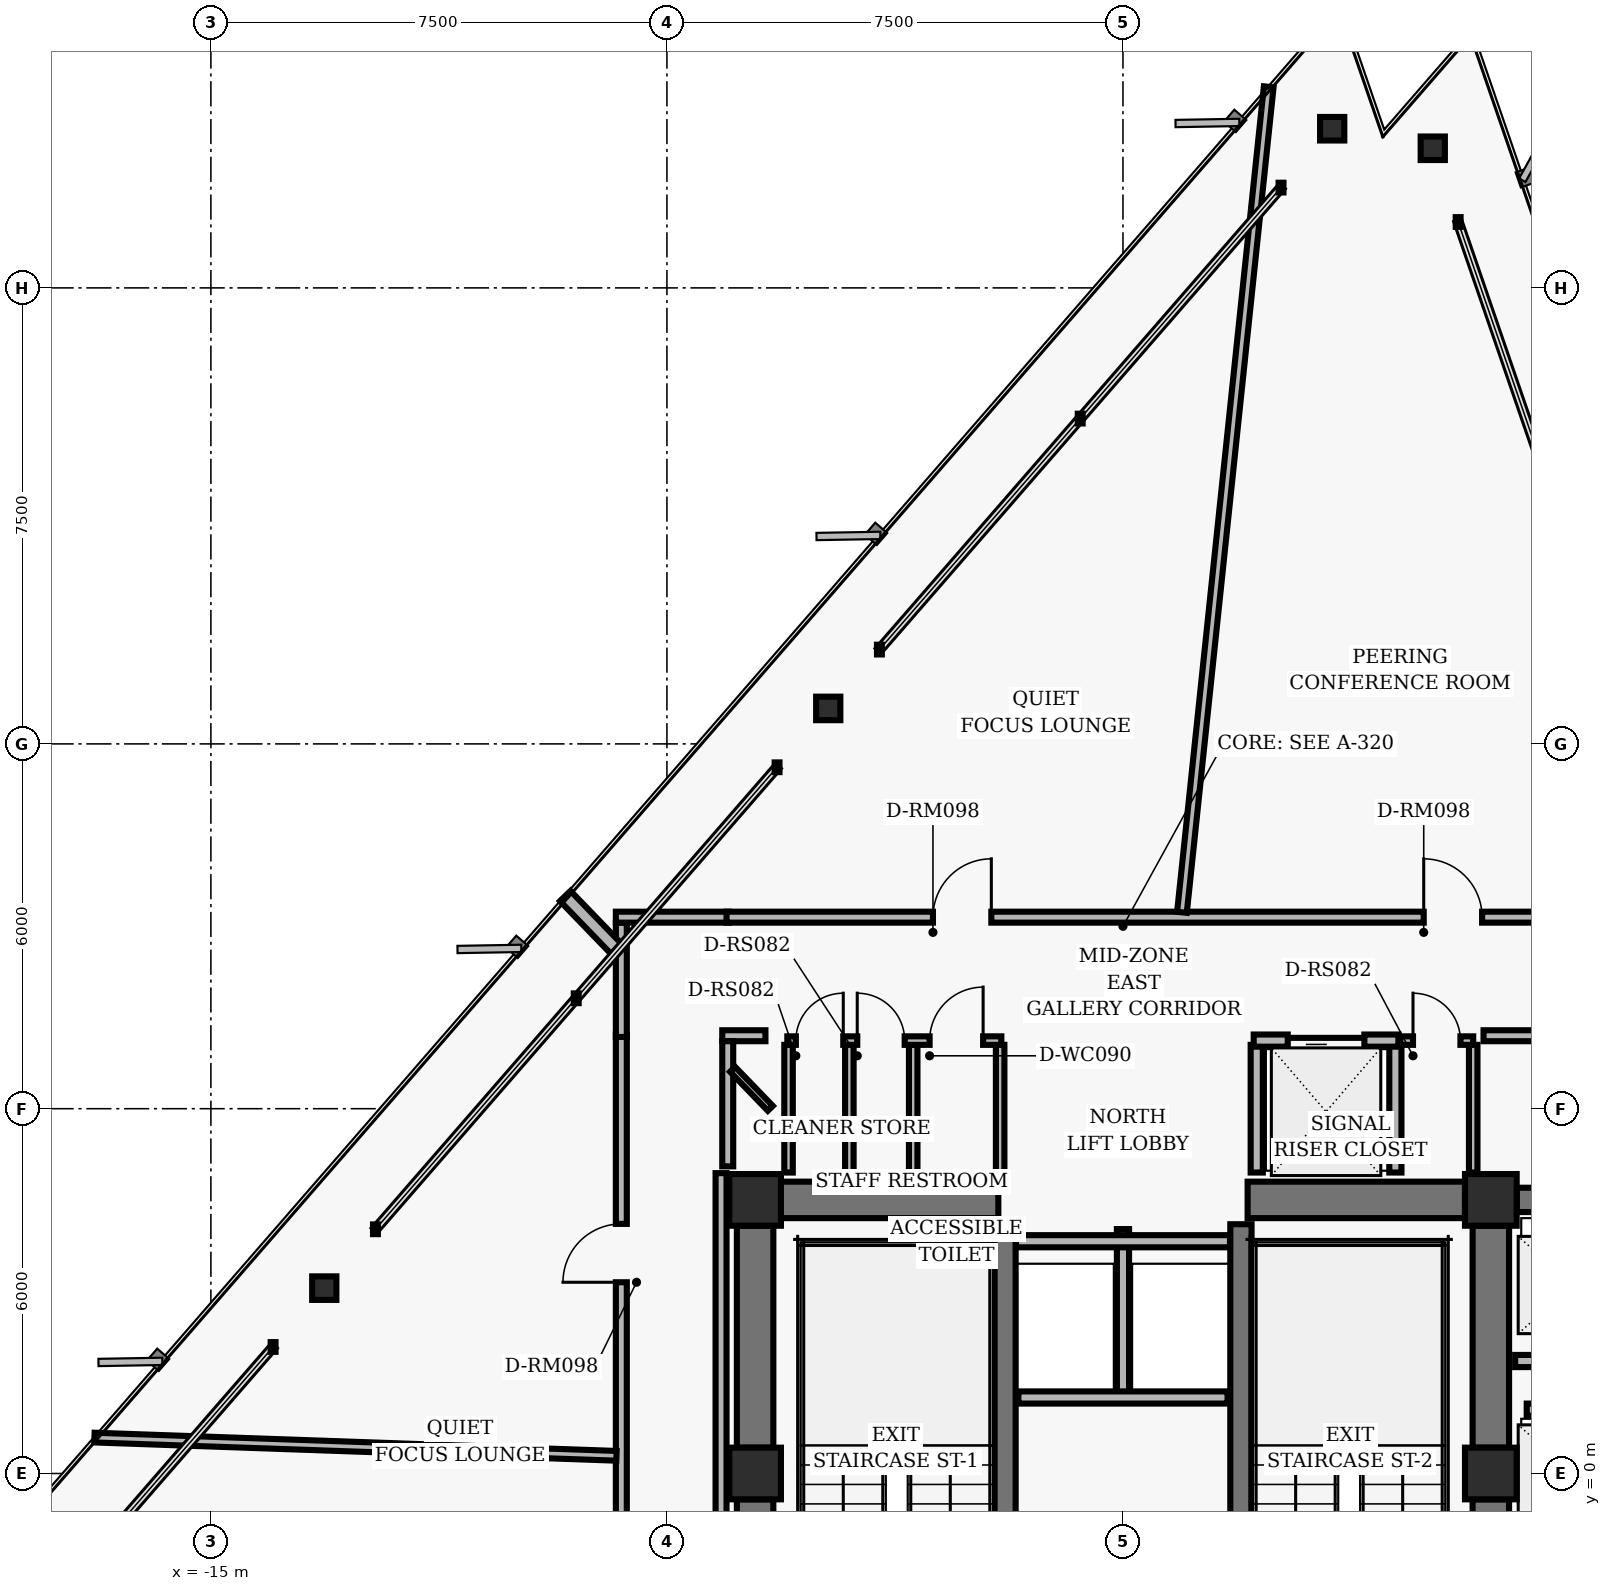
"""IFC4 building model, lengths in metres.
Left out: names, types, materials, properties, quantities, classifications, styles, units other than length and angle.
Written with IfcOpenShell. Run it as: python <this file> out.ifc"""

import sys

from ifc_helpers import new_model, si_unit, direction, frame, frame_2d, origin, origin_2d, place, context, subcontext, project, spatial, rectangle, hollow_rectangle, i_section, extrude, element, fill, save


model = new_model("IFC4")
c1 = context("Model", 3, precision=1e-05, world=origin(), true_north=direction((0.0, 1.0)))
c2 = subcontext(c1, "Body", "Model", "MODEL_VIEW")
j1 = project(units=[si_unit("LENGTHUNIT", "METRE"), si_unit("PLANEANGLEUNIT", "RADIAN")], contexts=[c1])
p1 = place(None, origin())
s1 = spatial("IfcSite", under=j1, at=p1, CompositionType="ELEMENT")
p2 = place(p1, origin())
s2 = spatial("IfcBuilding", under=s1, at=p2, CompositionType="ELEMENT")
p3 = place(p2, frame((0.0, 0.0, 165.44)))
s3 = spatial("IfcBuildingStorey", under=s2, at=p3, CompositionType="ELEMENT", Elevation=165.44)
for number, where, z_axis, x_axis in (
    (1, (-6.05, 4.5, 0.0), (0.0, 0.0, 1.0), (1.0, 0.0, 0.0)),
    (2, (6.05, 4.5, 0.0), (0.0, 0.0, 1.0), (1.0, 0.0, 0.0)),
    (3, (-6.05, 0.0, 0.0), (0.0, 0.0, 1.0), (1.0, 0.0, 0.0)),
    (4, (6.05, 0.0, 0.0), (0.0, 0.0, 1.0), (1.0, 0.0, 0.0)),
):
    element("IfcColumn", number, at=place(p3, frame(where, z_axis=z_axis, x_axis=x_axis)), inside=s3, PredefinedType="COLUMN", context=c2, shape_type="SweptSolid", body=[
        extrude(hollow_rectangle(XDim=0.85, YDim=0.85, WallThickness=0.055, InnerFilletRadius=0.02, OuterFilletRadius=0.04, at=origin_2d()), origin(), (0.0, 0.0, 1.0), 3.04),
    ])
p4 = place(p3, frame((-6.05, 0.425, 0.0), z_axis=(0.0, 0.0, 1.0), x_axis=(0.0, 1.0, 0.0)))
e5 = element("IfcWall", 5, at=p4, inside=s3, PredefinedType="SHEAR", context=c2, shape_type="SweptSolid", body=[
    extrude(rectangle(XDim=3.65, YDim=0.6, at=frame_2d((1.825, 0.0))), origin(), (0.0, 0.0, 1.0), 2.788),
])
p5 = place(p3, frame((-6.05, -3.875, 0.0), z_axis=(0.0, 0.0, 1.0), x_axis=(0.0, 1.0, 0.0)))
e6 = element("IfcWall", 6, at=p5, inside=s3, PredefinedType="SHEAR", context=c2, shape_type="SweptSolid", body=[
    extrude(rectangle(XDim=3.45, YDim=0.6, at=frame_2d((1.725, 0.0))), origin(), (0.0, 0.0, 1.0), 2.788),
])
p6 = place(p3, frame((6.05, 0.425, 0.0), z_axis=(0.0, 0.0, 1.0), x_axis=(0.0, 1.0, 0.0)))
e7 = element("IfcWall", 7, at=p6, inside=s3, PredefinedType="SHEAR", context=c2, shape_type="SweptSolid", body=[
    extrude(rectangle(XDim=3.65, YDim=0.6, at=frame_2d((1.825, 0.0))), origin(), (0.0, 0.0, 1.0), 2.788),
])
p7 = place(p3, frame((6.05, -3.875, 0.0), z_axis=(0.0, 0.0, 1.0), x_axis=(0.0, 1.0, 0.0)))
e8 = element("IfcWall", 8, at=p7, inside=s3, PredefinedType="SHEAR", context=c2, shape_type="SweptSolid", body=[
    extrude(rectangle(XDim=3.45, YDim=0.6, at=frame_2d((1.725, 0.0))), origin(), (0.0, 0.0, 1.0), 2.788),
])
for number, where, z_axis, x_axis in (
    (9, (-1.94, -4.1, 0.0), (0.0, 0.0, 1.0), (0.0, 1.0, 0.0)),
    (10, (1.94, -4.1, 0.0), (0.0, 0.0, 1.0), (0.0, 1.0, 0.0)),
):
    element("IfcWall", number, at=place(p3, frame(where, z_axis=z_axis, x_axis=x_axis)), inside=s3, PredefinedType="SHEAR", context=c2, shape_type="SweptSolid", body=[
        extrude(rectangle(XDim=8.2, YDim=0.35, at=frame_2d((4.1, 0.0))), origin(), (0.0, 0.0, 1.0), 2.788),
    ])
for number, where, z_axis, x_axis in (
    (11, (-5.625, 4.5, 0.0), (0.0, 0.0, 1.0), (1.0, 0.0, 0.0)),
    (12, (2.05, 4.5, 0.0), (0.0, 0.0, 1.0), (1.0, 0.0, 0.0)),
):
    element("IfcWall", number, at=place(p3, frame(where, z_axis=z_axis, x_axis=x_axis)), inside=s3, PredefinedType="SHEAR", context=c2, shape_type="SweptSolid", body=[
        extrude(rectangle(XDim=3.575, YDim=0.6, at=frame_2d((1.788, 0.0))), origin(), (0.0, 0.0, 1.0), 2.788),
    ])
p8 = place(p3, frame((6.475, 4.5, 0.0), z_axis=(0.0, 0.0, 1.0), x_axis=(1.0, 0.0, 0.0)))
e13 = element("IfcWall", 13, at=p8, inside=s3, PredefinedType="SHEAR", context=c2, shape_type="SweptSolid", body=[
    extrude(rectangle(XDim=2.05, YDim=0.4, at=frame_2d((1.025, 0.0))), origin(), (0.0, 0.0, 1.0), 2.788),
])
for number, where, z_axis, x_axis in (
    (14, (5.095, 21.796, 0.0), (0.0, 0.0, 1.0), (1.0, 0.0, 0.0)),
    (15, (3.441, 22.118, 0.0), (0.0, 0.0, 1.0), (1.0, 0.0, 0.0)),
    (16, (-4.847, 12.583, 0.0), (0.0, 0.0, 1.0), (1.0, 0.0, 0.0)),
    (17, (-13.135, 3.049, 0.0), (0.0, 0.0, 1.0), (1.0, 0.0, 0.0)),
):
    element("IfcColumn", number, at=place(p3, frame(where, z_axis=z_axis, x_axis=x_axis)), inside=s3, PredefinedType="COLUMN", context=c2, shape_type="SweptSolid", body=[
        extrude(i_section(OverallWidth=0.398, OverallDepth=0.387, WebThickness=0.021, FlangeThickness=0.033, FilletRadius=0.018, at=origin_2d()), origin(), (0.0, 0.0, 1.0), 3.04),
    ])
p9 = place(p3, frame((0.0, 1.25, 0.0), z_axis=(0.0, 0.0, 1.0), x_axis=(0.0, 1.0, 0.0)))
e18 = element("IfcWall", 18, at=p9, inside=s3, PredefinedType="PARTITIONING", context=c2, shape_type="SweptSolid", body=[
    extrude(rectangle(XDim=2.77, YDim=0.2, at=frame_2d((1.385, 0.0))), origin(), (0.0, 0.0, 1.0), 2.763),
])
p10 = place(p3, frame((-1.72, 1.25, 0.0), z_axis=(0.0, 0.0, 1.0), x_axis=(1.0, 0.0, 0.0)))
e19 = element("IfcWall", 19, at=p10, inside=s3, PredefinedType="PARTITIONING", context=c2, shape_type="SweptSolid", body=[
    extrude(rectangle(XDim=3.44, YDim=0.2, at=frame_2d((1.72, 0.0))), origin(), (0.0, 0.0, 1.0), 2.763),
])
p11 = place(p3, frame((-1.76, 3.82, 0.0), z_axis=(0.0, 0.0, 1.0), x_axis=(1.0, 0.0, 0.0)))
e20 = element("IfcWall", 20, at=p11, inside=s3, PredefinedType="PARTITIONING", context=c2, shape_type="SweptSolid", body=[
    extrude(rectangle(XDim=3.52, YDim=0.2, at=frame_2d((1.76, 0.0))), origin(), (0.0, 0.0, 1.0), 2.763),
])
for number, where, z_axis, x_axis in (
    (21, (2.2, 4.95, 0.0), (0.0, 0.0, 1.0), (0.0, 1.0, 0.0)),
    (22, (4.48, 4.95, 0.0), (0.0, 0.0, 1.0), (0.0, 1.0, 0.0)),
):
    element("IfcWall", number, at=place(p3, frame(where, z_axis=z_axis, x_axis=x_axis)), inside=s3, PredefinedType="PARTITIONING", context=c2, shape_type="SweptSolid", body=[
        extrude(rectangle(XDim=2.1, YDim=0.2, at=frame_2d((1.05, 0.0))), origin(), (0.0, 0.0, 1.0), 2.763),
    ])
p12 = place(p3, frame((2.15, 7.12, 0.0), z_axis=(0.0, 0.0, 1.0), x_axis=(1.0, 0.0, 0.0)))
e23 = element("IfcWall", 23, at=p12, inside=s3, PredefinedType="PARTITIONING", context=c2, shape_type="SweptSolid", body=[
    extrude(rectangle(XDim=2.38, YDim=0.2, at=frame_2d((1.19, 0.0))), origin(), (0.0, 0.0, 1.0), 2.763),
])
p13 = place(p12, frame((0.56, 0.0, 0.0)))
e24 = element("IfcOpeningElement", 24, at=p13, cuts=e23, PredefinedType="OPENING", context=c2, shape_type="SweptSolid", body=[
    extrude(rectangle(XDim=1.26, YDim=2.06, at=frame_2d((0.63, 1.03))), frame((0.0, 0.11, 0.0), z_axis=(0.0, -1.0, 0.0), x_axis=(1.0, 0.0, 0.0)), (0.0, 0.0, 1.0), 0.22),
])
for number, where, z_axis, x_axis in (
    (25, (-5.5, 4.95, 0.0), (0.0, 0.0, 1.0), (0.0, 1.0, 0.0)),
    (26, (-4.5, 4.95, 0.0), (0.0, 0.0, 1.0), (0.0, 1.0, 0.0)),
    (27, (-3.45, 4.95, 0.0), (0.0, 0.0, 1.0), (0.0, 1.0, 0.0)),
    (28, (-2.02, 4.95, 0.0), (0.0, 0.0, 1.0), (0.0, 1.0, 0.0)),
):
    element("IfcWall", number, at=place(p3, frame(where, z_axis=z_axis, x_axis=x_axis)), inside=s3, PredefinedType="PARTITIONING", context=c2, shape_type="SweptSolid", body=[
        extrude(rectangle(XDim=2.1, YDim=0.14, at=frame_2d((1.05, 0.0))), origin(), (0.0, 0.0, 1.0), 2.763),
    ])
p14 = place(p3, frame((-5.52, 7.12, 0.0), z_axis=(0.0, 0.0, 1.0), x_axis=(1.0, 0.0, 0.0)))
e29 = element("IfcWall", 29, at=p14, inside=s3, PredefinedType="PARTITIONING", context=c2, shape_type="SweptSolid", body=[
    extrude(rectangle(XDim=3.52, YDim=0.14, at=frame_2d((1.76, 0.0))), origin(), (0.0, 0.0, 1.0), 2.763),
])
p15 = place(p14, frame((0.14, 0.0, 0.0)))
e30 = element("IfcOpeningElement", 30, at=p15, cuts=e29, PredefinedType="OPENING", context=c2, shape_type="SweptSolid", body=[
    extrude(rectangle(XDim=0.78, YDim=2.01, at=frame_2d((0.39, 1.005))), frame((0.0, 0.08, 0.0), z_axis=(0.0, -1.0, 0.0), x_axis=(1.0, 0.0, 0.0)), (0.0, 0.0, 1.0), 0.16),
])
p16 = place(p14, frame((1.15, 0.0, 0.0)))
e31 = element("IfcOpeningElement", 31, at=p16, cuts=e29, PredefinedType="OPENING", context=c2, shape_type="SweptSolid", body=[
    extrude(rectangle(XDim=0.78, YDim=2.01, at=frame_2d((0.39, 1.005))), frame((0.0, 0.08, 0.0), z_axis=(0.0, -1.0, 0.0), x_axis=(1.0, 0.0, 0.0)), (0.0, 0.0, 1.0), 0.16),
])
p17 = place(p14, frame((2.34, 0.0, 0.0)))
e32 = element("IfcOpeningElement", 32, at=p17, cuts=e29, PredefinedType="OPENING", context=c2, shape_type="SweptSolid", body=[
    extrude(rectangle(XDim=0.88, YDim=2.02, at=frame_2d((0.44, 1.01))), frame((0.0, 0.08, 0.0), z_axis=(0.0, -1.0, 0.0), x_axis=(1.0, 0.0, 0.0)), (0.0, 0.0, 1.0), 0.16),
])
p18 = place(p3, frame((5.76, 4.95, 0.0), z_axis=(0.0, 0.0, 1.0), x_axis=(0.0, 1.0, 0.0)))
e33 = element("IfcWall", 33, at=p18, inside=s3, PredefinedType="PARTITIONING", context=c2, shape_type="SweptSolid", body=[
    extrude(rectangle(XDim=2.1, YDim=0.14, at=frame_2d((1.05, 0.0))), origin(), (0.0, 0.0, 1.0), 2.763),
])
p19 = place(p3, frame((4.56, 7.12, 0.0), z_axis=(0.0, 0.0, 1.0), x_axis=(1.0, 0.0, 0.0)))
e34 = element("IfcWall", 34, at=p19, inside=s3, PredefinedType="PARTITIONING", context=c2, shape_type="SweptSolid", body=[
    extrude(rectangle(XDim=1.2, YDim=0.14, at=frame_2d((0.6, 0.0))), origin(), (0.0, 0.0, 1.0), 2.763),
])
p20 = place(p19, frame((0.21, 0.0, 0.0)))
e35 = element("IfcOpeningElement", 35, at=p20, cuts=e34, PredefinedType="OPENING", context=c2, shape_type="SweptSolid", body=[
    extrude(rectangle(XDim=0.78, YDim=2.01, at=frame_2d((0.39, 1.005))), frame((0.0, 0.08, 0.0), z_axis=(0.0, -1.0, 0.0), x_axis=(1.0, 0.0, 0.0)), (0.0, 0.0, 1.0), 0.16),
])
p21 = place(p3, frame((6.45, 1.85, 0.0), z_axis=(0.0, 0.0, 1.0), x_axis=(1.0, 0.0, 0.0)))
e36 = element("IfcWall", 36, at=p21, inside=s3, PredefinedType="PARTITIONING", context=c2, shape_type="SweptSolid", body=[
    extrude(rectangle(XDim=2.1, YDim=0.2, at=frame_2d((1.05, 0.0))), origin(), (0.0, 0.0, 1.0), 2.763),
])
p22 = place(p3, frame((6.64, 1.05, 0.0), z_axis=(0.0, 0.0, 1.0), x_axis=(1.0, 0.0, 0.0)))
e37 = element("IfcWall", 37, at=p22, inside=s3, PredefinedType="PARTITIONING", context=c2, shape_type="SweptSolid", body=[
    extrude(rectangle(XDim=1.91, YDim=0.2, at=frame_2d((0.955, 0.0))), origin(), (0.0, 0.0, 1.0), 2.763),
])
p23 = place(p3, frame((-8.25, -7.22, 0.0), z_axis=(0.0, 0.0, 1.0), x_axis=(0.0, 1.0, 0.0)))
e38 = element("IfcWall", 38, at=p23, inside=s3, PredefinedType="PARTITIONING", context=c2, shape_type="SweptSolid", body=[
    extrude(rectangle(XDim=14.44, YDim=0.18, at=frame_2d((7.22, 0.0))), origin(), (0.0, 0.0, 1.0), 2.763),
])
p24 = place(p23, frame((4.478, 0.0, 0.0)))
e39 = element("IfcOpeningElement", 39, at=p24, cuts=e38, PredefinedType="OPENING", context=c2, shape_type="SweptSolid", body=[
    extrude(rectangle(XDim=0.96, YDim=2.02, at=frame_2d((0.48, 1.01))), frame((0.0, 0.1, 0.0), z_axis=(0.0, -1.0, 0.0), x_axis=(1.0, 0.0, 0.0)), (0.0, 0.0, 1.0), 0.2),
])
p25 = place(p23, frame((10.365, 0.0, 0.0)))
e40 = element("IfcOpeningElement", 40, at=p25, cuts=e38, PredefinedType="OPENING", context=c2, shape_type="SweptSolid", body=[
    extrude(rectangle(XDim=0.96, YDim=2.02, at=frame_2d((0.48, 1.01))), frame((0.0, 0.1, 0.0), z_axis=(0.0, -1.0, 0.0), x_axis=(1.0, 0.0, 0.0)), (0.0, 0.0, 1.0), 0.2),
])
p26 = place(p3, frame((-8.25, 7.18, 0.0), z_axis=(0.0, 0.0, 1.0), x_axis=(0.0, 1.0, 0.0)))
e41 = element("IfcWall", 41, at=p26, inside=s3, PredefinedType="PARTITIONING", context=c2, shape_type="SweptSolid", body=[
    extrude(rectangle(XDim=1.88, YDim=0.18, at=frame_2d((0.94, 0.0))), origin(), (0.0, 0.0, 1.0), 2.763),
])
p27 = place(p3, frame((-8.34, 9.15, 0.0), z_axis=(0.0, 0.0, 1.0), x_axis=(1.0, 0.0, 0.0)))
e42 = element("IfcWall", 42, at=p27, inside=s3, PredefinedType="PARTITIONING", context=c2, shape_type="SweptSolid", body=[
    extrude(rectangle(XDim=1.86, YDim=0.18, at=frame_2d((0.93, 0.0))), origin(), (0.0, 0.0, 1.0), 2.763),
])
p28 = place(p3, frame((-6.52, 9.15, 0.0), z_axis=(0.0, 0.0, 1.0), x_axis=(1.0, 0.0, 0.0)))
e43 = element("IfcWall", 43, at=p28, inside=s3, PredefinedType="PARTITIONING", context=c2, shape_type="SweptSolid", body=[
    extrude(rectangle(XDim=16.662, YDim=0.18, at=frame_2d((8.331, 0.0))), origin(), (0.0, 0.0, 1.0), 2.763),
])
p29 = place(p28, frame((11.466, 0.0, 0.0)))
e44 = element("IfcOpeningElement", 44, at=p29, cuts=e43, PredefinedType="OPENING", context=c2, shape_type="SweptSolid", body=[
    extrude(rectangle(XDim=0.96, YDim=2.02, at=frame_2d((0.48, 1.01))), frame((0.0, 0.1, 0.0), z_axis=(0.0, -1.0, 0.0), x_axis=(1.0, 0.0, 0.0)), (0.0, 0.0, 1.0), 0.2),
])
p30 = place(p28, frame((3.395, 0.0, 0.0)))
e45 = element("IfcOpeningElement", 45, at=p30, cuts=e43, PredefinedType="OPENING", context=c2, shape_type="SweptSolid", body=[
    extrude(rectangle(XDim=0.96, YDim=2.02, at=frame_2d((0.48, 1.01))), frame((0.0, 0.1, 0.0), z_axis=(0.0, -1.0, 0.0), x_axis=(1.0, 0.0, 0.0)), (0.0, 0.0, 1.0), 0.2),
])
p31 = place(p3, frame((10.814, 7.2, 0.0), z_axis=(0.0, 0.0, 1.0), x_axis=(-1.0, 0.0, 0.0)))
e46 = element("IfcWall", 46, at=p31, inside=s3, PredefinedType="PARTITIONING", context=c2, shape_type="SweptSolid", body=[
    extrude(rectangle(XDim=4.884, YDim=0.18, at=frame_2d((2.442, 0.0))), origin(), (0.0, 0.0, 1.0), 2.763),
])
p32 = place(p3, frame((-5.88, 7.2, 0.0), z_axis=(0.0, 0.0, 1.0), x_axis=(-1.0, 0.0, 0.0)))
e47 = element("IfcWall", 47, at=p32, inside=s3, PredefinedType="PARTITIONING", context=c2, shape_type="SweptSolid", body=[
    extrude(rectangle(XDim=0.71, YDim=0.18, at=frame_2d((0.355, 0.0))), origin(), (0.0, 0.0, 1.0), 2.763),
])
p33 = place(p3, frame((-6.5, 7.11, 0.0), z_axis=(0.0, 0.0, 1.0), x_axis=(0.0, -1.0, 0.0)))
e48 = element("IfcWall", 48, at=p33, inside=s3, PredefinedType="PARTITIONING", context=c2, shape_type="SweptSolid", body=[
    extrude(rectangle(XDim=2.058, YDim=0.18, at=frame_2d((1.029, 0.0))), origin(), (0.0, 0.0, 1.0), 2.763),
])
p34 = place(p3, frame((-6.61, 4.94, 0.0), z_axis=(0.0, 0.0, 1.0), x_axis=(0.0, -1.0, 0.0)))
e49 = element("IfcWall", 49, at=p34, inside=s3, PredefinedType="PARTITIONING", context=c2, shape_type="SweptSolid", body=[
    extrude(rectangle(XDim=9.46, YDim=0.18, at=frame_2d((4.73, 0.0))), origin(), (0.0, 0.0, 1.0), 2.763),
])
p35 = place(p3, frame((0.97, 9.23, 0.0), z_axis=(0.0, 0.0, 1.0), x_axis=(0.10452931889, 0.994521805438, 0.0)))
e50 = element("IfcWall", 50, at=p35, inside=s3, PredefinedType="PARTITIONING", context=c2, shape_type="SweptSolid", body=[
    extrude(rectangle(XDim=13.652, YDim=0.16, at=frame_2d((6.826, 0.0))), origin(), (0.0, 0.0, 1.0), 2.763),
])
p36 = place(p3, frame((-5.8, 6.006, 0.0), z_axis=(0.0, 0.0, 1.0), x_axis=(-0.694550575615, 0.719443881003, 0.0)))
e51 = element("IfcWall", 51, at=p36, inside=s3, PredefinedType="MOVABLE", context=c2, shape_type="SweptSolid", body=[
    extrude(rectangle(XDim=0.893, YDim=0.115, at=frame_2d((0.446, 0.0))), origin(), (0.0, 0.0, 1.0), 2.763),
])
p37 = place(p3, frame((-8.33, 8.626, 0.0), z_axis=(0.0, 0.0, 1.0), x_axis=(-0.694612484143, 0.719384109411, 0.0)))
e52 = element("IfcWall", 52, at=p37, inside=s3, PredefinedType="PARTITIONING", context=c2, shape_type="SweptSolid", body=[
    extrude(rectangle(XDim=1.212, YDim=0.24, at=frame_2d((0.606, 0.0))), origin(), (0.0, 0.0, 1.0), 2.763),
])
p38 = place(p3, frame((-8.33, 0.291, 0.0), z_axis=(0.0, 0.0, 1.0), x_axis=(-0.999390815976, 0.03489981294, 0.0)))
e53 = element("IfcWall", 53, at=p38, inside=s3, PredefinedType="PARTITIONING", context=c2, shape_type="SweptSolid", body=[
    extrude(rectangle(XDim=8.59, YDim=0.16, at=frame_2d((4.295, 0.0))), origin(), (0.0, 0.0, 1.0), 2.763),
])
p39 = place(p13, origin())
e54 = element("IfcDoor", 54, at=p39, inside=s3, OperationType="SLIDING_TO_LEFT", PredefinedType="DOOR", context=c2, shape_type="SweptSolid", body=[
    extrude(rectangle(XDim=1.26, YDim=2.06, at=frame_2d((0.63, 1.03))), frame((0.0, 0.025, 0.0), z_axis=(0.0, -1.0, 0.0), x_axis=(1.0, 0.0, 0.0)), (0.0, 0.0, 1.0), 0.05),
])
fill(e24, e54)
p40 = place(p15, origin())
e55 = element("IfcDoor", 55, at=p40, inside=s3, OperationType="SINGLE_SWING_RIGHT", PredefinedType="DOOR", context=c2, shape_type="SweptSolid", body=[
    extrude(rectangle(XDim=0.78, YDim=2.01, at=frame_2d((0.39, 1.005))), frame((0.0, 0.025, 0.0), z_axis=(0.0, -1.0, 0.0), x_axis=(1.0, 0.0, 0.0)), (0.0, 0.0, 1.0), 0.05),
])
fill(e30, e55)
p41 = place(p16, origin())
e56 = element("IfcDoor", 56, at=p41, inside=s3, OperationType="SINGLE_SWING_LEFT", PredefinedType="DOOR", context=c2, shape_type="SweptSolid", body=[
    extrude(rectangle(XDim=0.78, YDim=2.01, at=frame_2d((0.39, 1.005))), frame((0.0, 0.025, 0.0), z_axis=(0.0, -1.0, 0.0), x_axis=(1.0, 0.0, 0.0)), (0.0, 0.0, 1.0), 0.05),
])
fill(e31, e56)
p42 = place(p17, origin())
e57 = element("IfcDoor", 57, at=p42, inside=s3, OperationType="SINGLE_SWING_RIGHT", PredefinedType="DOOR", context=c2, shape_type="SweptSolid", body=[
    extrude(rectangle(XDim=0.88, YDim=2.02, at=frame_2d((0.44, 1.01))), frame((0.0, 0.025, 0.0), z_axis=(0.0, -1.0, 0.0), x_axis=(1.0, 0.0, 0.0)), (0.0, 0.0, 1.0), 0.05),
])
fill(e32, e57)
p43 = place(p20, origin())
e58 = element("IfcDoor", 58, at=p43, inside=s3, OperationType="SINGLE_SWING_LEFT", PredefinedType="DOOR", context=c2, shape_type="SweptSolid", body=[
    extrude(rectangle(XDim=0.78, YDim=2.01, at=frame_2d((0.39, 1.005))), frame((0.0, 0.025, 0.0), z_axis=(0.0, -1.0, 0.0), x_axis=(1.0, 0.0, 0.0)), (0.0, 0.0, 1.0), 0.05),
])
fill(e35, e58)
p44 = place(p29, origin())
e59 = element("IfcDoor", 59, at=p44, inside=s3, OperationType="SINGLE_SWING_LEFT", PredefinedType="DOOR", context=c2, shape_type="SweptSolid", body=[
    extrude(rectangle(XDim=0.96, YDim=2.02, at=frame_2d((0.48, 1.01))), frame((0.0, 0.025, 0.0), z_axis=(0.0, -1.0, 0.0), x_axis=(1.0, 0.0, 0.0)), (0.0, 0.0, 1.0), 0.05),
])
fill(e44, e59)
p45 = place(p30, origin())
e60 = element("IfcDoor", 60, at=p45, inside=s3, OperationType="SINGLE_SWING_RIGHT", PredefinedType="DOOR", context=c2, shape_type="SweptSolid", body=[
    extrude(rectangle(XDim=0.96, YDim=2.02, at=frame_2d((0.48, 1.01))), frame((0.0, 0.025, 0.0), z_axis=(0.0, -1.0, 0.0), x_axis=(1.0, 0.0, 0.0)), (0.0, 0.0, 1.0), 0.05),
])
fill(e45, e60)
p46 = place(p25, origin())
e61 = element("IfcDoor", 61, at=p46, inside=s3, OperationType="SINGLE_SWING_LEFT", PredefinedType="DOOR", context=c2, shape_type="SweptSolid", body=[
    extrude(rectangle(XDim=0.96, YDim=2.02, at=frame_2d((0.48, 1.01))), frame((0.0, 0.025, 0.0), z_axis=(0.0, -1.0, 0.0), x_axis=(1.0, 0.0, 0.0)), (0.0, 0.0, 1.0), 0.05),
])
fill(e40, e61)
save(model, sys.argv[1])
